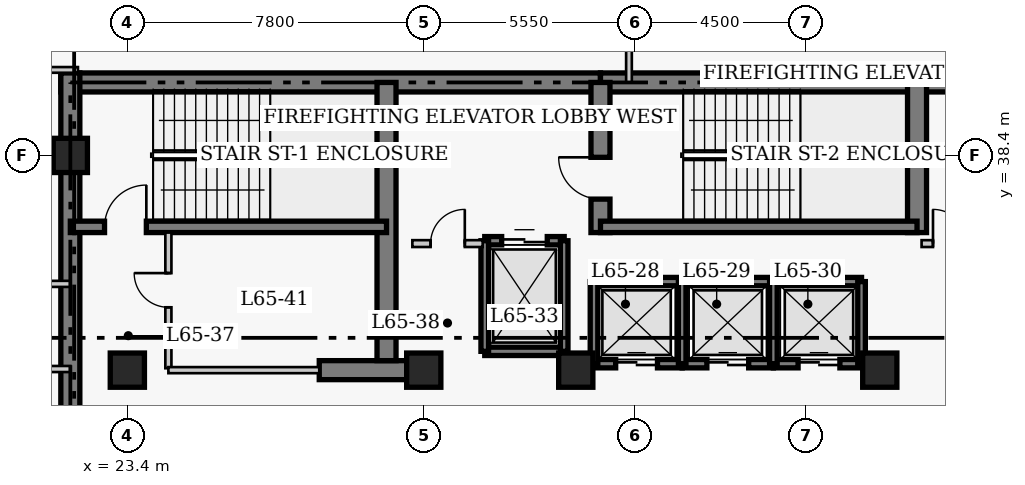
"""IFC4 building model, lengths in metres.
Left out: names, types, materials, properties, quantities, classifications, styles, units other than length and angle.
Written with IfcOpenShell. Run it as: python <this file> out.ifc"""

import sys

from ifc_helpers import new_model, si_unit, direction, frame, frame_2d, origin, origin_2d, place, context, subcontext, project, spatial, rectangle, extrude, element, fill, save


model = new_model("IFC4")
c1 = context("Model", 3, precision=1e-05, world=origin(), true_north=direction((0.0, 1.0)))
c2 = subcontext(c1, "Body", "Model", "MODEL_VIEW")
j1 = project(units=[si_unit("LENGTHUNIT", "METRE"), si_unit("PLANEANGLEUNIT", "RADIAN")], contexts=[c1])
p1 = place(None, origin())
s1 = spatial("IfcSite", under=j1, at=p1, CompositionType="ELEMENT")
p2 = place(p1, origin())
s2 = spatial("IfcBuilding", under=s1, at=p2, CompositionType="ELEMENT")
p3 = place(p2, frame((0.0, 0.0, 261.4)))
s3 = spatial("IfcBuildingStorey", under=s2, at=p3, CompositionType="ELEMENT", Elevation=261.4)
p4 = place(p3, frame((21.65, 40.32, 0.0), z_axis=(0.0, 0.0, 1.0), x_axis=(1.0, 0.0, 0.0)))
e1 = element("IfcWall", 1, at=p4, inside=s3, PredefinedType="SHEAR", context=c2, shape_type="SweptSolid", body=[
    extrude(rectangle(XDim=14.2, YDim=0.5, at=frame_2d((7.1, 0.0))), origin(), (0.0, 0.0, 1.0), 4.0),
])
p5 = place(p3, frame((35.85, 40.32, 0.0), z_axis=(0.0, 0.0, 1.0), x_axis=(1.0, 0.0, 0.0)))
e2 = element("IfcWall", 2, at=p5, inside=s3, PredefinedType="SHEAR", context=c2, shape_type="SweptSolid", body=[
    extrude(rectangle(XDim=12.6, YDim=0.5, at=frame_2d((6.3, 0.0))), origin(), (0.0, 0.0, 1.0), 4.0),
])
p6 = place(p3, frame((21.9, 27.05, 0.0), z_axis=(0.0, 0.0, 1.0), x_axis=(0.0, 1.0, 0.0)))
e3 = element("IfcWall", 3, at=p6, inside=s3, PredefinedType="SHEAR", context=c2, shape_type="SweptSolid", body=[
    extrude(rectangle(XDim=13.52, YDim=0.5, at=frame_2d((6.76, 0.0))), origin(), (0.0, 0.0, 1.0), 4.0),
])
p7 = place(p3, frame((28.45, 32.75, 0.0), z_axis=(0.0, 0.0, 1.0), x_axis=(1.0, 0.0, 0.0)))
e4 = element("IfcWall", 4, at=p7, inside=s3, PredefinedType="SHEAR", context=c2, shape_type="SweptSolid", body=[
    extrude(rectangle(XDim=2.4, YDim=0.5, at=frame_2d((1.2, 0.0))), origin(), (0.0, 0.0, 1.0), 4.0),
])
p8 = place(p3, frame((30.22, 33.0, 0.0), z_axis=(0.0, 0.0, 1.0), x_axis=(0.0, 1.0, 0.0)))
e5 = element("IfcWall", 5, at=p8, inside=s3, PredefinedType="SHEAR", context=c2, shape_type="SweptSolid", body=[
    extrude(rectangle(XDim=7.32, YDim=0.5, at=frame_2d((3.66, 0.0))), origin(), (0.0, 0.0, 1.0), 4.0),
])
p9 = place(p3, frame((35.85, 36.37, 0.0), z_axis=(0.0, 0.0, 1.0), x_axis=(0.0, 1.0, 0.0)))
e6 = element("IfcWall", 6, at=p9, inside=s3, PredefinedType="SHEAR", context=c2, shape_type="SweptSolid", body=[
    extrude(rectangle(XDim=3.95, YDim=0.5, at=frame_2d((1.975, 0.0))), origin(), (0.0, 0.0, 1.0), 4.0),
])
p10 = place(p9, frame((0.88, 0.0, 0.0)))
e7 = element("IfcOpeningElement", 7, at=p10, cuts=e6, PredefinedType="OPENING", context=c2, shape_type="SweptSolid", body=[
    extrude(rectangle(XDim=1.1, YDim=2.15, at=frame_2d((0.55, 1.075))), frame((0.0, 0.26, 0.0), z_axis=(0.0, -1.0, 0.0), x_axis=(1.0, 0.0, 0.0)), (0.0, 0.0, 1.0), 0.52),
])
p11 = place(p3, frame((44.18, 36.37, 0.0), z_axis=(0.0, 0.0, 1.0), x_axis=(0.0, 1.0, 0.0)))
e8 = element("IfcWall", 8, at=p11, inside=s3, PredefinedType="SHEAR", context=c2, shape_type="SweptSolid", body=[
    extrude(rectangle(XDim=3.95, YDim=0.5, at=frame_2d((1.975, 0.0))), origin(), (0.0, 0.0, 1.0), 4.0),
])
p12 = place(p3, frame((21.9, 36.52, 0.0), z_axis=(0.0, 0.0, 1.0), x_axis=(1.0, 0.0, 0.0)))
e9 = element("IfcWall", 9, at=p12, inside=s3, PredefinedType="SHEAR", context=c2, shape_type="SweptSolid", body=[
    extrude(rectangle(XDim=8.32, YDim=0.3, at=frame_2d((4.16, 0.0))), origin(), (0.0, 0.0, 1.0), 4.0),
])
p13 = place(p12, frame((0.9, 0.0, 0.0)))
e10 = element("IfcOpeningElement", 10, at=p13, cuts=e9, PredefinedType="OPENING", context=c2, shape_type="SweptSolid", body=[
    extrude(rectangle(XDim=1.1, YDim=2.15, at=frame_2d((0.55, 1.075))), frame((0.0, 0.16, 0.0), z_axis=(0.0, -1.0, 0.0), x_axis=(1.0, 0.0, 0.0)), (0.0, 0.0, 1.0), 0.32),
])
p14 = place(p3, frame((35.85, 36.52, 0.0), z_axis=(0.0, 0.0, 1.0), x_axis=(1.0, 0.0, 0.0)))
e11 = element("IfcWall", 11, at=p14, inside=s3, PredefinedType="SHEAR", context=c2, shape_type="SweptSolid", body=[
    extrude(rectangle(XDim=8.33, YDim=0.3, at=frame_2d((4.165, 0.0))), origin(), (0.0, 0.0, 1.0), 4.0),
])
for number, where, z_axis, x_axis in (
    (12, (21.9, 38.4, 0.0), (0.0, 0.0, 1.0), (1.0, 0.0, 0.0)),
    (13, (23.4, 32.75, 0.0), (0.0, 0.0, 1.0), (1.0, 0.0, 0.0)),
    (14, (31.2, 32.75, 0.0), (0.0, 0.0, 1.0), (1.0, 0.0, 0.0)),
    (15, (35.2, 32.75, 0.0), (0.0, 0.0, 1.0), (1.0, 0.0, 0.0)),
    (16, (43.2, 32.75, 0.0), (0.0, 0.0, 1.0), (1.0, 0.0, 0.0)),
):
    element("IfcColumn", number, at=place(p3, frame(where, z_axis=z_axis, x_axis=x_axis)), inside=s3, PredefinedType="COLUMN", context=c2, shape_type="SweptSolid", body=[
        extrude(rectangle(XDim=0.9, YDim=0.9, at=origin_2d()), origin(), (0.0, 0.0, 1.0), 4.0),
    ])
p15 = place(p3, frame((35.68, 35.08, 0.0), z_axis=(0.0, 0.0, 1.0), x_axis=(1.0, 0.0, 0.0)))
e17 = element("IfcWall", 17, at=p15, inside=s3, PredefinedType="SHEAR", context=c2, shape_type="SweptSolid", body=[
    extrude(rectangle(XDim=2.32, YDim=0.22, at=frame_2d((1.16, 0.0))), origin(), (0.0, 0.0, 1.0), 4.0),
])
p16 = place(p3, frame((35.68, 32.92, 0.0), z_axis=(0.0, 0.0, 1.0), x_axis=(1.0, 0.0, 0.0)))
e18 = element("IfcWall", 18, at=p16, inside=s3, PredefinedType="SHEAR", context=c2, shape_type="SweptSolid", body=[
    extrude(rectangle(XDim=2.32, YDim=0.22, at=frame_2d((1.16, 0.0))), origin(), (0.0, 0.0, 1.0), 4.0),
])
p17 = place(p16, frame((0.57, 0.0, 0.0)))
e19 = element("IfcOpeningElement", 19, at=p17, cuts=e18, PredefinedType="OPENING", context=c2, shape_type="SweptSolid", body=[
    extrude(rectangle(XDim=1.1, YDim=2.15, at=frame_2d((0.55, 1.075))), frame((0.0, 0.12, 0.0), z_axis=(0.0, -1.0, 0.0), x_axis=(1.0, 0.0, 0.0)), (0.0, 0.0, 1.0), 0.24),
])
p18 = place(p3, frame((35.68, 32.92, 0.0), z_axis=(0.0, 0.0, 1.0), x_axis=(0.0, 1.0, 0.0)))
e20 = element("IfcWall", 20, at=p18, inside=s3, PredefinedType="SHEAR", context=c2, shape_type="SweptSolid", body=[
    extrude(rectangle(XDim=2.16, YDim=0.2, at=frame_2d((1.08, 0.0))), origin(), (0.0, 0.0, 1.0), 4.0),
])
p19 = place(p3, frame((38.0, 35.08, 0.0), z_axis=(0.0, 0.0, 1.0), x_axis=(1.0, 0.0, 0.0)))
e21 = element("IfcWall", 21, at=p19, inside=s3, PredefinedType="SHEAR", context=c2, shape_type="SweptSolid", body=[
    extrude(rectangle(XDim=2.4, YDim=0.22, at=frame_2d((1.2, 0.0))), origin(), (0.0, 0.0, 1.0), 4.0),
])
p20 = place(p3, frame((38.0, 32.92, 0.0), z_axis=(0.0, 0.0, 1.0), x_axis=(1.0, 0.0, 0.0)))
e22 = element("IfcWall", 22, at=p20, inside=s3, PredefinedType="SHEAR", context=c2, shape_type="SweptSolid", body=[
    extrude(rectangle(XDim=2.4, YDim=0.22, at=frame_2d((1.2, 0.0))), origin(), (0.0, 0.0, 1.0), 4.0),
])
p21 = place(p20, frame((0.65, 0.0, 0.0)))
e23 = element("IfcOpeningElement", 23, at=p21, cuts=e22, PredefinedType="OPENING", context=c2, shape_type="SweptSolid", body=[
    extrude(rectangle(XDim=1.1, YDim=2.15, at=frame_2d((0.55, 1.075))), frame((0.0, 0.12, 0.0), z_axis=(0.0, -1.0, 0.0), x_axis=(1.0, 0.0, 0.0)), (0.0, 0.0, 1.0), 0.24),
])
p22 = place(p3, frame((38.0, 32.92, 0.0), z_axis=(0.0, 0.0, 1.0), x_axis=(0.0, 1.0, 0.0)))
e24 = element("IfcWall", 24, at=p22, inside=s3, PredefinedType="SHEAR", context=c2, shape_type="SweptSolid", body=[
    extrude(rectangle(XDim=2.16, YDim=0.2, at=frame_2d((1.08, 0.0))), origin(), (0.0, 0.0, 1.0), 4.0),
])
p23 = place(p3, frame((40.4, 35.08, 0.0), z_axis=(0.0, 0.0, 1.0), x_axis=(1.0, 0.0, 0.0)))
e25 = element("IfcWall", 25, at=p23, inside=s3, PredefinedType="SHEAR", context=c2, shape_type="SweptSolid", body=[
    extrude(rectangle(XDim=2.32, YDim=0.22, at=frame_2d((1.16, 0.0))), origin(), (0.0, 0.0, 1.0), 4.0),
])
p24 = place(p3, frame((40.4, 32.92, 0.0), z_axis=(0.0, 0.0, 1.0), x_axis=(1.0, 0.0, 0.0)))
e26 = element("IfcWall", 26, at=p24, inside=s3, PredefinedType="SHEAR", context=c2, shape_type="SweptSolid", body=[
    extrude(rectangle(XDim=2.32, YDim=0.22, at=frame_2d((1.16, 0.0))), origin(), (0.0, 0.0, 1.0), 4.0),
])
p25 = place(p24, frame((0.65, 0.0, 0.0)))
e27 = element("IfcOpeningElement", 27, at=p25, cuts=e26, PredefinedType="OPENING", context=c2, shape_type="SweptSolid", body=[
    extrude(rectangle(XDim=1.1, YDim=2.15, at=frame_2d((0.55, 1.075))), frame((0.0, 0.12, 0.0), z_axis=(0.0, -1.0, 0.0), x_axis=(1.0, 0.0, 0.0)), (0.0, 0.0, 1.0), 0.24),
])
for number, where, z_axis, x_axis in (
    (28, (40.4, 32.92, 0.0), (0.0, 0.0, 1.0), (0.0, 1.0, 0.0)),
    (29, (42.72, 32.92, 0.0), (0.0, 0.0, 1.0), (0.0, 1.0, 0.0)),
):
    element("IfcWall", number, at=place(p3, frame(where, z_axis=z_axis, x_axis=x_axis)), inside=s3, PredefinedType="SHEAR", context=c2, shape_type="SweptSolid", body=[
        extrude(rectangle(XDim=2.16, YDim=0.2, at=frame_2d((1.08, 0.0))), origin(), (0.0, 0.0, 1.0), 4.0),
    ])
p26 = place(p3, frame((32.805, 36.155, 0.0), z_axis=(0.0, 0.0, 1.0), x_axis=(1.0, 0.0, 0.0)))
e30 = element("IfcWall", 30, at=p26, inside=s3, PredefinedType="SHEAR", context=c2, shape_type="SweptSolid", body=[
    extrude(rectangle(XDim=2.09, YDim=0.22, at=frame_2d((1.045, 0.0))), origin(), (0.0, 0.0, 1.0), 4.0),
])
p27 = place(p26, frame((0.445, 0.0, 0.0)))
e31 = element("IfcOpeningElement", 31, at=p27, cuts=e30, PredefinedType="OPENING", context=c2, shape_type="SweptSolid", body=[
    extrude(rectangle(XDim=1.2, YDim=2.15, at=frame_2d((0.6, 1.075))), frame((0.0, 0.12, 0.0), z_axis=(0.0, -1.0, 0.0), x_axis=(1.0, 0.0, 0.0)), (0.0, 0.0, 1.0), 0.24),
])
p28 = place(p3, frame((32.805, 33.245, 0.0), z_axis=(0.0, 0.0, 1.0), x_axis=(1.0, 0.0, 0.0)))
e32 = element("IfcWall", 32, at=p28, inside=s3, PredefinedType="SHEAR", context=c2, shape_type="SweptSolid", body=[
    extrude(rectangle(XDim=2.09, YDim=0.22, at=frame_2d((1.045, 0.0))), origin(), (0.0, 0.0, 1.0), 4.0),
])
for number, where, z_axis, x_axis in (
    (33, (32.805, 33.245, 0.0), (0.0, 0.0, 1.0), (0.0, 1.0, 0.0)),
    (34, (34.895, 33.245, 0.0), (0.0, 0.0, 1.0), (0.0, 1.0, 0.0)),
):
    element("IfcWall", number, at=place(p3, frame(where, z_axis=z_axis, x_axis=x_axis)), inside=s3, PredefinedType="SHEAR", context=c2, shape_type="SweptSolid", body=[
        extrude(rectangle(XDim=2.91, YDim=0.2, at=frame_2d((1.455, 0.0))), origin(), (0.0, 0.0, 1.0), 4.0),
    ])
p29 = place(p3, frame((30.9, 36.08, 0.0), z_axis=(0.0, 0.0, 1.0), x_axis=(1.0, 0.0, 0.0)))
e35 = element("IfcWall", 35, at=p29, inside=s3, PredefinedType="PARTITIONING", context=c2, shape_type="SweptSolid", body=[
    extrude(rectangle(XDim=1.85, YDim=0.18, at=frame_2d((0.925, 0.0))), origin(), (0.0, 0.0, 1.0), 3.76),
])
p30 = place(p29, frame((0.48, 0.0, 0.0)))
e36 = element("IfcOpeningElement", 36, at=p30, cuts=e35, PredefinedType="OPENING", context=c2, shape_type="SweptSolid", body=[
    extrude(rectangle(XDim=0.9, YDim=2.15, at=frame_2d((0.45, 1.075))), frame((0.0, 0.1, 0.0), z_axis=(0.0, -1.0, 0.0), x_axis=(1.0, 0.0, 0.0)), (0.0, 0.0, 1.0), 0.2),
])
p31 = place(p3, frame((44.3, 36.08, 0.0), z_axis=(0.0, 0.0, 1.0), x_axis=(1.0, 0.0, 0.0)))
e37 = element("IfcWall", 37, at=p31, inside=s3, PredefinedType="PARTITIONING", context=c2, shape_type="SweptSolid", body=[
    extrude(rectangle(XDim=1.5, YDim=0.18, at=frame_2d((0.75, 0.0))), origin(), (0.0, 0.0, 1.0), 3.76),
])
p32 = place(p31, frame((0.3, 0.0, 0.0)))
e38 = element("IfcOpeningElement", 38, at=p32, cuts=e37, PredefinedType="OPENING", context=c2, shape_type="SweptSolid", body=[
    extrude(rectangle(XDim=0.9, YDim=2.15, at=frame_2d((0.45, 1.075))), frame((0.0, 0.1, 0.0), z_axis=(0.0, -1.0, 0.0), x_axis=(1.0, 0.0, 0.0)), (0.0, 0.0, 1.0), 0.2),
])
p33 = place(p3, frame((24.48, 32.8, 0.0), z_axis=(0.0, 0.0, 1.0), x_axis=(0.0, 1.0, 0.0)))
e39 = element("IfcWall", 39, at=p33, inside=s3, PredefinedType="PARTITIONING", context=c2, shape_type="SweptSolid", body=[
    extrude(rectangle(XDim=3.57, YDim=0.16, at=frame_2d((1.785, 0.0))), origin(), (0.0, 0.0, 1.0), 3.76),
])
p34 = place(p33, frame((1.604, 0.0, 0.0)))
e40 = element("IfcOpeningElement", 40, at=p34, cuts=e39, PredefinedType="OPENING", context=c2, shape_type="SweptSolid", body=[
    extrude(rectangle(XDim=0.9, YDim=2.1, at=frame_2d((0.45, 1.05))), frame((0.0, 0.09, 0.0), z_axis=(0.0, -1.0, 0.0), x_axis=(1.0, 0.0, 0.0)), (0.0, 0.0, 1.0), 0.18),
])
p35 = place(p3, frame((24.48, 32.75, 0.0), z_axis=(0.0, 0.0, 1.0), x_axis=(1.0, 0.0, 0.0)))
e41 = element("IfcWall", 41, at=p35, inside=s3, PredefinedType="PARTITIONING", context=c2, shape_type="SweptSolid", body=[
    extrude(rectangle(XDim=3.97, YDim=0.16, at=frame_2d((1.985, 0.0))), origin(), (0.0, 0.0, 1.0), 3.76),
])
for number, where, z_axis, x_axis in (
    (42, (19.16, 35.02, 0.0), (0.0, 0.0, 1.0), (1.0, 0.0, 0.0)),
    (43, (19.16, 32.78, 0.0), (0.0, 0.0, 1.0), (1.0, 0.0, 0.0)),
):
    element("IfcWall", number, at=place(p3, frame(where, z_axis=z_axis, x_axis=x_axis)), inside=s3, PredefinedType="PARTITIONING", context=c2, shape_type="SweptSolid", body=[
        extrude(rectangle(XDim=2.74, YDim=0.16, at=frame_2d((1.37, 0.0))), origin(), (0.0, 0.0, 1.0), 3.76),
    ])
p36 = place(p3, frame((16.94, 40.65, 0.0), z_axis=(0.0, 0.0, 1.0), x_axis=(1.0, 0.0, 0.0)))
e44 = element("IfcWall", 44, at=p36, inside=s3, PredefinedType="PARTITIONING", context=c2, shape_type="SweptSolid", body=[
    extrude(rectangle(XDim=5.16, YDim=0.15, at=frame_2d((2.58, 0.0))), origin(), (0.0, 0.0, 1.0), 3.76),
])
p37 = place(p36, frame((0.55, 0.0, 0.0)))
e45 = element("IfcOpeningElement", 45, at=p37, cuts=e44, PredefinedType="OPENING", context=c2, shape_type="SweptSolid", body=[
    extrude(rectangle(XDim=1.0, YDim=2.15, at=frame_2d((0.5, 1.075))), frame((0.0, 0.085, 0.0), z_axis=(0.0, -1.0, 0.0), x_axis=(1.0, 0.0, 0.0)), (0.0, 0.0, 1.0), 0.17),
])
p38 = place(p3, frame((36.6, 40.32, 0.0), z_axis=(0.0, 0.0, 1.0), x_axis=(0.0, 1.0, 0.0)))
e46 = element("IfcWall", 46, at=p38, inside=s3, PredefinedType="PARTITIONING", context=c2, shape_type="SweptSolid", body=[
    extrude(rectangle(XDim=3.545, YDim=0.15, at=frame_2d((1.772, 0.0))), origin(), (0.0, 0.0, 1.0), 3.76),
])
p39 = place(p17, origin())
e47 = element("IfcDoor", 47, at=p39, inside=s3, OperationType="DOUBLE_DOOR_SLIDING", PredefinedType="DOOR", context=c2, shape_type="SweptSolid", body=[
    extrude(rectangle(XDim=1.1, YDim=2.15, at=frame_2d((0.55, 1.075))), frame((0.0, 0.025, 0.0), z_axis=(0.0, -1.0, 0.0), x_axis=(1.0, 0.0, 0.0)), (0.0, 0.0, 1.0), 0.05),
])
fill(e19, e47)
p40 = place(p21, origin())
e48 = element("IfcDoor", 48, at=p40, inside=s3, OperationType="DOUBLE_DOOR_SLIDING", PredefinedType="DOOR", context=c2, shape_type="SweptSolid", body=[
    extrude(rectangle(XDim=1.1, YDim=2.15, at=frame_2d((0.55, 1.075))), frame((0.0, 0.025, 0.0), z_axis=(0.0, -1.0, 0.0), x_axis=(1.0, 0.0, 0.0)), (0.0, 0.0, 1.0), 0.05),
])
fill(e23, e48)
p41 = place(p25, origin())
e49 = element("IfcDoor", 49, at=p41, inside=s3, OperationType="DOUBLE_DOOR_SLIDING", PredefinedType="DOOR", context=c2, shape_type="SweptSolid", body=[
    extrude(rectangle(XDim=1.1, YDim=2.15, at=frame_2d((0.55, 1.075))), frame((0.0, 0.025, 0.0), z_axis=(0.0, -1.0, 0.0), x_axis=(1.0, 0.0, 0.0)), (0.0, 0.0, 1.0), 0.05),
])
fill(e27, e49)
p42 = place(p27, origin())
e50 = element("IfcDoor", 50, at=p42, inside=s3, OperationType="DOUBLE_DOOR_SLIDING", PredefinedType="DOOR", context=c2, shape_type="SweptSolid", body=[
    extrude(rectangle(XDim=1.2, YDim=2.15, at=frame_2d((0.6, 1.075))), frame((0.0, 0.025, 0.0), z_axis=(0.0, -1.0, 0.0), x_axis=(1.0, 0.0, 0.0)), (0.0, 0.0, 1.0), 0.05),
])
fill(e31, e50)
p43 = place(p30, origin())
e51 = element("IfcDoor", 51, at=p43, inside=s3, OperationType="SINGLE_SWING_RIGHT", PredefinedType="DOOR", context=c2, shape_type="SweptSolid", body=[
    extrude(rectangle(XDim=0.9, YDim=2.15, at=frame_2d((0.45, 1.075))), frame((0.0, 0.025, 0.0), z_axis=(0.0, -1.0, 0.0), x_axis=(1.0, 0.0, 0.0)), (0.0, 0.0, 1.0), 0.05),
])
fill(e36, e51)
p44 = place(p32, origin())
e52 = element("IfcDoor", 52, at=p44, inside=s3, OperationType="SINGLE_SWING_LEFT", PredefinedType="DOOR", context=c2, shape_type="SweptSolid", body=[
    extrude(rectangle(XDim=0.9, YDim=2.15, at=frame_2d((0.45, 1.075))), frame((0.0, 0.025, 0.0), z_axis=(0.0, -1.0, 0.0), x_axis=(1.0, 0.0, 0.0)), (0.0, 0.0, 1.0), 0.05),
])
fill(e38, e52)
p45 = place(p34, origin())
e53 = element("IfcDoor", 53, at=p45, inside=s3, OperationType="SINGLE_SWING_RIGHT", PredefinedType="DOOR", context=c2, shape_type="SweptSolid", body=[
    extrude(rectangle(XDim=0.9, YDim=2.1, at=frame_2d((0.45, 1.05))), frame((0.0, 0.025, 0.0), z_axis=(0.0, -1.0, 0.0), x_axis=(1.0, 0.0, 0.0)), (0.0, 0.0, 1.0), 0.05),
])
fill(e40, e53)
p46 = place(p13, origin())
e54 = element("IfcDoor", 54, at=p46, inside=s3, OperationType="SINGLE_SWING_RIGHT", PredefinedType="DOOR", context=c2, shape_type="SweptSolid", body=[
    extrude(rectangle(XDim=1.1, YDim=2.15, at=frame_2d((0.55, 1.075))), frame((0.0, 0.025, 0.0), z_axis=(0.0, -1.0, 0.0), x_axis=(1.0, 0.0, 0.0)), (0.0, 0.0, 1.0), 0.05),
])
fill(e10, e54)
p47 = place(p10, origin())
e55 = element("IfcDoor", 55, at=p47, inside=s3, OperationType="SINGLE_SWING_RIGHT", PredefinedType="DOOR", context=c2, shape_type="SweptSolid", body=[
    extrude(rectangle(XDim=1.1, YDim=2.15, at=frame_2d((0.55, 1.075))), frame((0.0, 0.025, 0.0), z_axis=(0.0, -1.0, 0.0), x_axis=(1.0, 0.0, 0.0)), (0.0, 0.0, 1.0), 0.05),
])
fill(e7, e55)
save(model, sys.argv[1])
